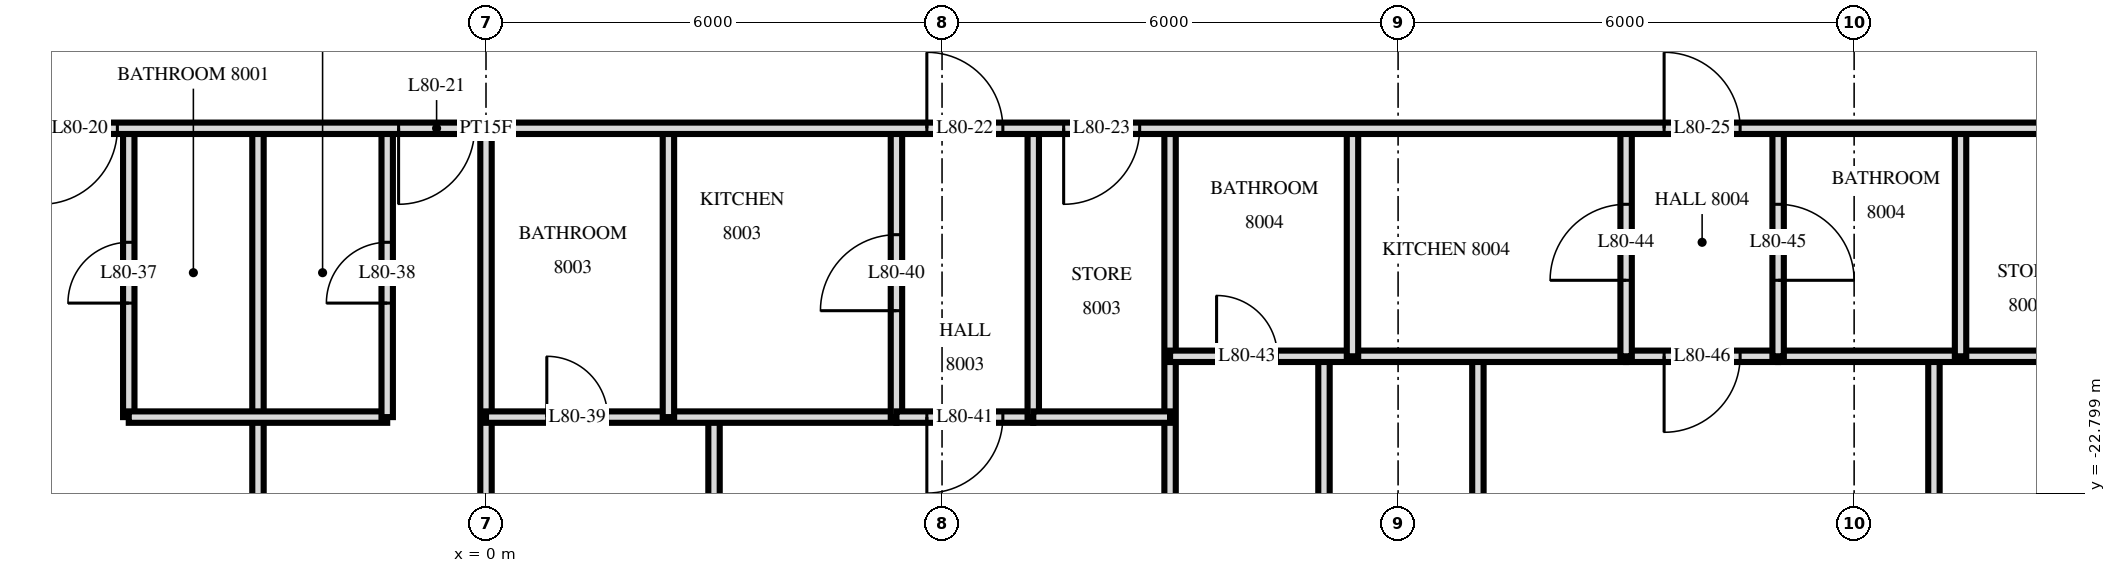
"""IFC4 building model, lengths in metres.
Left out: names, types, materials, properties, quantities, classifications, styles, units other than length and angle.
Written with IfcOpenShell. Run it as: python <this file> out.ifc"""

import sys

from ifc_helpers import new_model, si_unit, direction, frame, frame_2d, origin, place, context, subcontext, project, spatial, rectangle, extrude, element, fill, save


model = new_model("IFC4")
c1 = context("Model", 3, precision=1e-05, world=origin(), true_north=direction((0.0, 1.0)))
c2 = subcontext(c1, "Body", "Model", "MODEL_VIEW")
j1 = project(units=[si_unit("LENGTHUNIT", "METRE"), si_unit("PLANEANGLEUNIT", "RADIAN")], contexts=[c1])
p1 = place(None, origin())
s1 = spatial("IfcSite", under=j1, at=p1, CompositionType="ELEMENT")
p2 = place(p1, origin())
s2 = spatial("IfcBuilding", under=s1, at=p2, CompositionType="ELEMENT")
p3 = place(p2, frame((0.0, 0.0, 301.6)))
s3 = spatial("IfcBuildingStorey", under=s2, at=p3, CompositionType="ELEMENT", Elevation=301.6)
p4 = place(p3, frame((19.4, -21.0, 0.0), z_axis=(0.0, 0.0, 1.0), x_axis=(0.0, 1.0, 0.0)))
e1 = element("IfcWall", 1, at=p4, inside=s3, PredefinedType="PARTITIONING", context=c2, shape_type="SweptSolid", body=[
    extrude(rectangle(XDim=3.0, YDim=0.15, at=frame_2d((1.5, 0.0))), origin(), (0.0, 0.0, 1.0), 3.22),
])
p5 = place(p3, frame((19.05, -33.527, 0.0), z_axis=(0.0, 0.0, 1.0), x_axis=(0.0, 1.0, 0.0)))
e2 = element("IfcWall", 2, at=p5, inside=s3, PredefinedType="PARTITIONING", context=c2, shape_type="SweptSolid", body=[
    extrude(rectangle(XDim=12.527, YDim=0.15, at=frame_2d((6.264, 0.0))), origin(), (0.0, 0.0, 1.0), 3.22),
])
p6 = place(p5, frame((5.707, 0.0, 0.0)))
e3 = element("IfcOpeningElement", 3, at=p6, cuts=e2, PredefinedType="OPENING", context=c2, shape_type="SweptSolid", body=[
    extrude(rectangle(XDim=0.9, YDim=2.1, at=frame_2d((0.45, 1.05))), frame((0.0, 0.085, 0.0), z_axis=(0.0, -1.0, 0.0), x_axis=(1.0, 0.0, 0.0)), (0.0, 0.0, 1.0), 0.17),
])
p7 = place(p3, frame((17.0, -21.0, 0.0), z_axis=(0.0, 0.0, 1.0), x_axis=(0.0, 1.0, 0.0)))
e4 = element("IfcWall", 4, at=p7, inside=s3, PredefinedType="PARTITIONING", context=c2, shape_type="SweptSolid", body=[
    extrude(rectangle(XDim=3.0, YDim=0.15, at=frame_2d((1.5, 0.0))), origin(), (0.0, 0.0, 1.0), 3.22),
])
p8 = place(p7, frame((1.0, 0.0, 0.0)))
e5 = element("IfcOpeningElement", 5, at=p8, cuts=e4, PredefinedType="OPENING", context=c2, shape_type="SweptSolid", body=[
    extrude(rectangle(XDim=1.0, YDim=2.1, at=frame_2d((0.5, 1.05))), frame((0.0, 0.085, 0.0), z_axis=(0.0, -1.0, 0.0), x_axis=(1.0, 0.0, 0.0)), (0.0, 0.0, 1.0), 0.17),
])
p9 = place(p3, frame((15.0, -21.0, 0.0), z_axis=(0.0, 0.0, 1.0), x_axis=(0.0, 1.0, 0.0)))
e6 = element("IfcWall", 6, at=p9, inside=s3, PredefinedType="PARTITIONING", context=c2, shape_type="SweptSolid", body=[
    extrude(rectangle(XDim=3.0, YDim=0.15, at=frame_2d((1.5, 0.0))), origin(), (0.0, 0.0, 1.0), 3.22),
])
p10 = place(p9, frame((1.0, 0.0, 0.0)))
e7 = element("IfcOpeningElement", 7, at=p10, cuts=e6, PredefinedType="OPENING", context=c2, shape_type="SweptSolid", body=[
    extrude(rectangle(XDim=1.0, YDim=2.1, at=frame_2d((0.5, 1.05))), frame((0.0, 0.085, 0.0), z_axis=(0.0, -1.0, 0.0), x_axis=(1.0, 0.0, 0.0)), (0.0, 0.0, 1.0), 0.17),
])
p11 = place(p3, frame((13.05, -33.62, 0.0), z_axis=(0.0, 0.0, 1.0), x_axis=(0.0, 1.0, 0.0)))
e8 = element("IfcWall", 8, at=p11, inside=s3, PredefinedType="PARTITIONING", context=c2, shape_type="SweptSolid", body=[
    extrude(rectangle(XDim=12.62, YDim=0.15, at=frame_2d((6.31, 0.0))), origin(), (0.0, 0.0, 1.0), 3.22),
])
p12 = place(p11, frame((5.79, 0.0, 0.0)))
e9 = element("IfcOpeningElement", 9, at=p12, cuts=e8, PredefinedType="OPENING", context=c2, shape_type="SweptSolid", body=[
    extrude(rectangle(XDim=0.9, YDim=2.1, at=frame_2d((0.45, 1.05))), frame((0.0, 0.085, 0.0), z_axis=(0.0, -1.0, 0.0), x_axis=(1.0, 0.0, 0.0)), (0.0, 0.0, 1.0), 0.17),
])
p13 = place(p3, frame((11.4, -21.0, 0.0), z_axis=(0.0, 0.0, 1.0), x_axis=(0.0, 1.0, 0.0)))
e10 = element("IfcWall", 10, at=p13, inside=s3, PredefinedType="PARTITIONING", context=c2, shape_type="SweptSolid", body=[
    extrude(rectangle(XDim=3.0, YDim=0.15, at=frame_2d((1.5, 0.0))), origin(), (0.0, 0.0, 1.0), 3.22),
])
p14 = place(p3, frame((11.025, -33.62, 0.0), z_axis=(0.0, 0.0, 1.0), x_axis=(0.0, 1.0, 0.0)))
e11 = element("IfcWall", 11, at=p14, inside=s3, PredefinedType="PARTITIONING", context=c2, shape_type="SweptSolid", body=[
    extrude(rectangle(XDim=12.62, YDim=0.15, at=frame_2d((6.31, 0.0))), origin(), (0.0, 0.0, 1.0), 3.22),
])
p15 = place(p14, frame((5.79, 0.0, 0.0)))
e12 = element("IfcOpeningElement", 12, at=p15, cuts=e11, PredefinedType="OPENING", context=c2, shape_type="SweptSolid", body=[
    extrude(rectangle(XDim=0.9, YDim=2.1, at=frame_2d((0.45, 1.05))), frame((0.0, 0.085, 0.0), z_axis=(0.0, -1.0, 0.0), x_axis=(1.0, 0.0, 0.0)), (0.0, 0.0, 1.0), 0.17),
])
p16 = place(p3, frame((9.0, -33.62, 0.0), z_axis=(0.0, 0.0, 1.0), x_axis=(0.0, 1.0, 0.0)))
e13 = element("IfcWall", 13, at=p16, inside=s3, PredefinedType="PARTITIONING", context=c2, shape_type="SweptSolid", body=[
    extrude(rectangle(XDim=15.62, YDim=0.15, at=frame_2d((7.81, 0.0))), origin(), (0.0, 0.0, 1.0), 3.22),
])
p17 = place(p3, frame((7.2, -21.8, 0.0), z_axis=(0.0, 0.0, 1.0), x_axis=(0.0, 1.0, 0.0)))
e14 = element("IfcWall", 14, at=p17, inside=s3, PredefinedType="PARTITIONING", context=c2, shape_type="SweptSolid", body=[
    extrude(rectangle(XDim=3.8, YDim=0.15, at=frame_2d((1.9, 0.0))), origin(), (0.0, 0.0, 1.0), 3.22),
])
p18 = place(p3, frame((5.4, -21.8, 0.0), z_axis=(0.0, 0.0, 1.0), x_axis=(0.0, 1.0, 0.0)))
e15 = element("IfcWall", 15, at=p18, inside=s3, PredefinedType="PARTITIONING", context=c2, shape_type="SweptSolid", body=[
    extrude(rectangle(XDim=3.8, YDim=0.15, at=frame_2d((1.9, 0.0))), origin(), (0.0, 0.0, 1.0), 3.22),
])
p19 = place(p18, frame((1.4, 0.0, 0.0)))
e16 = element("IfcOpeningElement", 16, at=p19, cuts=e15, PredefinedType="OPENING", context=c2, shape_type="SweptSolid", body=[
    extrude(rectangle(XDim=1.0, YDim=2.1, at=frame_2d((0.5, 1.05))), frame((0.0, 0.085, 0.0), z_axis=(0.0, -1.0, 0.0), x_axis=(1.0, 0.0, 0.0)), (0.0, 0.0, 1.0), 0.17),
])
p20 = place(p3, frame((3.0, -33.62, 0.0), z_axis=(0.0, 0.0, 1.0), x_axis=(0.0, 1.0, 0.0)))
e17 = element("IfcWall", 17, at=p20, inside=s3, PredefinedType="PARTITIONING", context=c2, shape_type="SweptSolid", body=[
    extrude(rectangle(XDim=11.82, YDim=0.15, at=frame_2d((5.91, 0.0))), origin(), (0.0, 0.0, 1.0), 3.22),
])
p21 = place(p20, frame((5.37, 0.0, 0.0)))
e18 = element("IfcOpeningElement", 18, at=p21, cuts=e17, PredefinedType="OPENING", context=c2, shape_type="SweptSolid", body=[
    extrude(rectangle(XDim=0.9, YDim=2.1, at=frame_2d((0.45, 1.05))), frame((0.0, 0.085, 0.0), z_axis=(0.0, -1.0, 0.0), x_axis=(1.0, 0.0, 0.0)), (0.0, 0.0, 1.0), 0.17),
])
p22 = place(p3, frame((2.4, -21.8, 0.0), z_axis=(0.0, 0.0, 1.0), x_axis=(0.0, 1.0, 0.0)))
e19 = element("IfcWall", 19, at=p22, inside=s3, PredefinedType="PARTITIONING", context=c2, shape_type="SweptSolid", body=[
    extrude(rectangle(XDim=3.8, YDim=0.15, at=frame_2d((1.9, 0.0))), origin(), (0.0, 0.0, 1.0), 3.22),
])
p23 = place(p3, frame((0.0, -33.62, 0.0), z_axis=(0.0, 0.0, 1.0), x_axis=(0.0, 1.0, 0.0)))
e20 = element("IfcWall", 20, at=p23, inside=s3, PredefinedType="PARTITIONING", context=c2, shape_type="SweptSolid", body=[
    extrude(rectangle(XDim=15.62, YDim=0.15, at=frame_2d((7.81, 0.0))), origin(), (0.0, 0.0, 1.0), 3.22),
])
p24 = place(p3, frame((-1.3, -21.8, 0.0), z_axis=(0.0, 0.0, 1.0), x_axis=(0.0, 1.0, 0.0)))
e21 = element("IfcWall", 21, at=p24, inside=s3, PredefinedType="PARTITIONING", context=c2, shape_type="SweptSolid", body=[
    extrude(rectangle(XDim=3.8, YDim=0.15, at=frame_2d((1.9, 0.0))), origin(), (0.0, 0.0, 1.0), 3.22),
])
p25 = place(p24, frame((1.5, 0.0, 0.0)))
e22 = element("IfcOpeningElement", 22, at=p25, cuts=e21, PredefinedType="OPENING", context=c2, shape_type="SweptSolid", body=[
    extrude(rectangle(XDim=0.8, YDim=2.1, at=frame_2d((0.4, 1.05))), frame((0.0, 0.085, 0.0), z_axis=(0.0, -1.0, 0.0), x_axis=(1.0, 0.0, 0.0)), (0.0, 0.0, 1.0), 0.17),
])
p26 = place(p3, frame((-3.0, -33.62, 0.0), z_axis=(0.0, 0.0, 1.0), x_axis=(0.0, 1.0, 0.0)))
e23 = element("IfcWall", 23, at=p26, inside=s3, PredefinedType="PARTITIONING", context=c2, shape_type="SweptSolid", body=[
    extrude(rectangle(XDim=15.62, YDim=0.15, at=frame_2d((7.81, 0.0))), origin(), (0.0, 0.0, 1.0), 3.22),
])
p27 = place(p3, frame((-4.7, -21.8, 0.0), z_axis=(0.0, 0.0, 1.0), x_axis=(0.0, 1.0, 0.0)))
e24 = element("IfcWall", 24, at=p27, inside=s3, PredefinedType="PARTITIONING", context=c2, shape_type="SweptSolid", body=[
    extrude(rectangle(XDim=3.8, YDim=0.15, at=frame_2d((1.9, 0.0))), origin(), (0.0, 0.0, 1.0), 3.22),
])
p28 = place(p27, frame((1.5, 0.0, 0.0)))
e25 = element("IfcOpeningElement", 25, at=p28, cuts=e24, PredefinedType="OPENING", context=c2, shape_type="SweptSolid", body=[
    extrude(rectangle(XDim=0.8, YDim=2.1, at=frame_2d((0.4, 1.05))), frame((0.0, 0.085, 0.0), z_axis=(0.0, -1.0, 0.0), x_axis=(1.0, 0.0, 0.0)), (0.0, 0.0, 1.0), 0.17),
])
p29 = place(p3, frame((5.4, -21.8, 0.0), z_axis=(0.0, 0.0, 1.0), x_axis=(1.0, 0.0, 0.0)))
e26 = element("IfcWall", 26, at=p29, inside=s3, PredefinedType="PARTITIONING", context=c2, shape_type="SweptSolid", body=[
    extrude(rectangle(XDim=1.8, YDim=0.15, at=frame_2d((0.9, 0.0))), origin(), (0.0, 0.0, 1.0), 3.22),
])
p30 = place(p29, frame((0.4, 0.0, 0.0)))
e27 = element("IfcOpeningElement", 27, at=p30, cuts=e26, PredefinedType="OPENING", context=c2, shape_type="SweptSolid", body=[
    extrude(rectangle(XDim=1.0, YDim=2.1, at=frame_2d((0.5, 1.05))), frame((0.0, 0.085, 0.0), z_axis=(0.0, -1.0, 0.0), x_axis=(1.0, 0.0, 0.0)), (0.0, 0.0, 1.0), 0.17),
])
p31 = place(p3, frame((-4.7, -21.8, 0.0), z_axis=(0.0, 0.0, 1.0), x_axis=(1.0, 0.0, 0.0)))
e28 = element("IfcWall", 28, at=p31, inside=s3, PredefinedType="PARTITIONING", context=c2, shape_type="SweptSolid", body=[
    extrude(rectangle(XDim=3.4, YDim=0.15, at=frame_2d((1.7, 0.0))), origin(), (0.0, 0.0, 1.0), 3.22),
])
p32 = place(p3, frame((0.0, -21.8, 0.0), z_axis=(0.0, 0.0, 1.0), x_axis=(1.0, 0.0, 0.0)))
e29 = element("IfcWall", 29, at=p32, inside=s3, PredefinedType="PARTITIONING", context=c2, shape_type="SweptSolid", body=[
    extrude(rectangle(XDim=5.4, YDim=0.15, at=frame_2d((2.7, 0.0))), origin(), (0.0, 0.0, 1.0), 3.22),
])
p33 = place(p32, frame((0.8, 0.0, 0.0)))
e30 = element("IfcOpeningElement", 30, at=p33, cuts=e29, PredefinedType="OPENING", context=c2, shape_type="SweptSolid", body=[
    extrude(rectangle(XDim=0.8, YDim=2.1, at=frame_2d((0.4, 1.05))), frame((0.0, 0.085, 0.0), z_axis=(0.0, -1.0, 0.0), x_axis=(1.0, 0.0, 0.0)), (0.0, 0.0, 1.0), 0.17),
])
p34 = place(p3, frame((7.2, -21.8, 0.0), z_axis=(0.0, 0.0, 1.0), x_axis=(1.0, 0.0, 0.0)))
e31 = element("IfcWall", 31, at=p34, inside=s3, PredefinedType="PARTITIONING", context=c2, shape_type="SweptSolid", body=[
    extrude(rectangle(XDim=1.8, YDim=0.15, at=frame_2d((0.9, 0.0))), origin(), (0.0, 0.0, 1.0), 3.22),
])
p35 = place(p3, frame((15.0, -21.0, 0.0), z_axis=(0.0, 0.0, 1.0), x_axis=(1.0, 0.0, 0.0)))
e32 = element("IfcWall", 32, at=p35, inside=s3, PredefinedType="PARTITIONING", context=c2, shape_type="SweptSolid", body=[
    extrude(rectangle(XDim=2.0, YDim=0.15, at=frame_2d((1.0, 0.0))), origin(), (0.0, 0.0, 1.0), 3.22),
])
p36 = place(p35, frame((0.5, 0.0, 0.0)))
e33 = element("IfcOpeningElement", 33, at=p36, cuts=e32, PredefinedType="OPENING", context=c2, shape_type="SweptSolid", body=[
    extrude(rectangle(XDim=1.0, YDim=2.1, at=frame_2d((0.5, 1.05))), frame((0.0, 0.085, 0.0), z_axis=(0.0, -1.0, 0.0), x_axis=(1.0, 0.0, 0.0)), (0.0, 0.0, 1.0), 0.17),
])
p37 = place(p3, frame((9.0, -21.0, 0.0), z_axis=(0.0, 0.0, 1.0), x_axis=(1.0, 0.0, 0.0)))
e34 = element("IfcWall", 34, at=p37, inside=s3, PredefinedType="PARTITIONING", context=c2, shape_type="SweptSolid", body=[
    extrude(rectangle(XDim=6.0, YDim=0.15, at=frame_2d((3.0, 0.0))), origin(), (0.0, 0.0, 1.0), 3.22),
])
p38 = place(p37, frame((0.612, 0.0, 0.0)))
e35 = element("IfcOpeningElement", 35, at=p38, cuts=e34, PredefinedType="OPENING", context=c2, shape_type="SweptSolid", body=[
    extrude(rectangle(XDim=0.8, YDim=2.1, at=frame_2d((0.4, 1.05))), frame((0.0, 0.085, 0.0), z_axis=(0.0, -1.0, 0.0), x_axis=(1.0, 0.0, 0.0)), (0.0, 0.0, 1.0), 0.17),
])
p39 = place(p3, frame((17.0, -21.0, 0.0), z_axis=(0.0, 0.0, 1.0), x_axis=(1.0, 0.0, 0.0)))
e36 = element("IfcWall", 36, at=p39, inside=s3, PredefinedType="PARTITIONING", context=c2, shape_type="SweptSolid", body=[
    extrude(rectangle(XDim=5.92, YDim=0.15, at=frame_2d((2.96, 0.0))), origin(), (0.0, 0.0, 1.0), 3.22),
])
p40 = place(p3, frame((-22.92, -18.0, 0.0), z_axis=(0.0, 0.0, 1.0), x_axis=(1.0, 0.0, 0.0)))
e37 = element("IfcWall", 37, at=p40, inside=s3, PredefinedType="PARTITIONING", context=c2, shape_type="SweptSolid", body=[
    extrude(rectangle(XDim=45.84, YDim=0.15, at=frame_2d((22.92, 0.0))), origin(), (0.0, 0.0, 1.0), 3.22),
])
p41 = place(p40, frame((17.07, 0.0, 0.0)))
e38 = element("IfcOpeningElement", 38, at=p41, cuts=e37, PredefinedType="OPENING", context=c2, shape_type="SweptSolid", body=[
    extrude(rectangle(XDim=1.0, YDim=2.1, at=frame_2d((0.5, 1.05))), frame((0.0, 0.085, 0.0), z_axis=(0.0, -1.0, 0.0), x_axis=(1.0, 0.0, 0.0)), (0.0, 0.0, 1.0), 0.17),
])
p42 = place(p40, frame((21.77, 0.0, 0.0)))
e39 = element("IfcOpeningElement", 39, at=p42, cuts=e37, PredefinedType="OPENING", context=c2, shape_type="SweptSolid", body=[
    extrude(rectangle(XDim=1.0, YDim=2.1, at=frame_2d((0.5, 1.05))), frame((0.0, 0.085, 0.0), z_axis=(0.0, -1.0, 0.0), x_axis=(1.0, 0.0, 0.0)), (0.0, 0.0, 1.0), 0.17),
])
p43 = place(p40, frame((28.72, 0.0, 0.0)))
e40 = element("IfcOpeningElement", 40, at=p43, cuts=e37, PredefinedType="OPENING", context=c2, shape_type="SweptSolid", body=[
    extrude(rectangle(XDim=1.0, YDim=2.1, at=frame_2d((0.5, 1.05))), frame((0.0, 0.085, 0.0), z_axis=(0.0, -1.0, 0.0), x_axis=(1.0, 0.0, 0.0)), (0.0, 0.0, 1.0), 0.17),
])
p44 = place(p40, frame((30.52, 0.0, 0.0)))
e41 = element("IfcOpeningElement", 41, at=p44, cuts=e37, PredefinedType="OPENING", context=c2, shape_type="SweptSolid", body=[
    extrude(rectangle(XDim=1.0, YDim=2.1, at=frame_2d((0.5, 1.05))), frame((0.0, 0.085, 0.0), z_axis=(0.0, -1.0, 0.0), x_axis=(1.0, 0.0, 0.0)), (0.0, 0.0, 1.0), 0.17),
])
p45 = place(p40, frame((7.87, 0.0, 0.0)))
e42 = element("IfcOpeningElement", 42, at=p45, cuts=e37, PredefinedType="OPENING", context=c2, shape_type="SweptSolid", body=[
    extrude(rectangle(XDim=1.0, YDim=2.1, at=frame_2d((0.5, 1.05))), frame((0.0, 0.085, 0.0), z_axis=(0.0, -1.0, 0.0), x_axis=(1.0, 0.0, 0.0)), (0.0, 0.0, 1.0), 0.17),
])
p46 = place(p40, frame((38.42, 0.0, 0.0)))
e43 = element("IfcOpeningElement", 43, at=p46, cuts=e37, PredefinedType="OPENING", context=c2, shape_type="SweptSolid", body=[
    extrude(rectangle(XDim=1.0, YDim=2.1, at=frame_2d((0.5, 1.05))), frame((0.0, 0.085, 0.0), z_axis=(0.0, -1.0, 0.0), x_axis=(1.0, 0.0, 0.0)), (0.0, 0.0, 1.0), 0.17),
])
p47 = place(p40, frame((43.67, 0.0, 0.0)))
e44 = element("IfcOpeningElement", 44, at=p47, cuts=e37, PredefinedType="OPENING", context=c2, shape_type="SweptSolid", body=[
    extrude(rectangle(XDim=1.0, YDim=2.1, at=frame_2d((0.5, 1.05))), frame((0.0, 0.085, 0.0), z_axis=(0.0, -1.0, 0.0), x_axis=(1.0, 0.0, 0.0)), (0.0, 0.0, 1.0), 0.17),
])
p48 = place(p41, frame((0.5, 0.0, 0.0), z_axis=(0.0, 0.0, 1.0), x_axis=(-1.0, 0.0, 0.0)))
e45 = element("IfcDoor", 45, at=p48, inside=s3, OperationType="SINGLE_SWING_LEFT", PredefinedType="DOOR", context=c2, shape_type="SweptSolid", body=[
    extrude(rectangle(XDim=1.0, YDim=2.1, at=frame_2d((0.0, 1.05))), frame((0.0, -0.025, 0.0), z_axis=(0.0, 1.0, 0.0), x_axis=(-1.0, 0.0, 0.0)), (0.0, 0.0, 1.0), 0.05),
])
fill(e38, e45)
p49 = place(p42, frame((0.5, 0.0, 0.0), z_axis=(0.0, 0.0, 1.0), x_axis=(-1.0, 0.0, 0.0)))
e46 = element("IfcDoor", 46, at=p49, inside=s3, OperationType="SINGLE_SWING_LEFT", PredefinedType="DOOR", context=c2, shape_type="SweptSolid", body=[
    extrude(rectangle(XDim=1.0, YDim=2.1, at=frame_2d((0.0, 1.05))), frame((0.0, -0.025, 0.0), z_axis=(0.0, 1.0, 0.0), x_axis=(-1.0, 0.0, 0.0)), (0.0, 0.0, 1.0), 0.05),
])
fill(e39, e46)
p50 = place(p43, origin())
e47 = element("IfcDoor", 47, at=p50, inside=s3, OperationType="SINGLE_SWING_RIGHT", PredefinedType="DOOR", context=c2, shape_type="SweptSolid", body=[
    extrude(rectangle(XDim=1.0, YDim=2.1, at=frame_2d((0.5, 1.05))), frame((0.0, 0.025, 0.0), z_axis=(0.0, -1.0, 0.0), x_axis=(1.0, 0.0, 0.0)), (0.0, 0.0, 1.0), 0.05),
])
fill(e40, e47)
p51 = place(p44, frame((0.5, 0.0, 0.0), z_axis=(0.0, 0.0, 1.0), x_axis=(-1.0, 0.0, 0.0)))
e48 = element("IfcDoor", 48, at=p51, inside=s3, OperationType="SINGLE_SWING_LEFT", PredefinedType="DOOR", context=c2, shape_type="SweptSolid", body=[
    extrude(rectangle(XDim=1.0, YDim=2.1, at=frame_2d((0.0, 1.05))), frame((0.0, -0.025, 0.0), z_axis=(0.0, 1.0, 0.0), x_axis=(-1.0, 0.0, 0.0)), (0.0, 0.0, 1.0), 0.05),
])
fill(e41, e48)
p52 = place(p46, origin())
e49 = element("IfcDoor", 49, at=p52, inside=s3, OperationType="SINGLE_SWING_RIGHT", PredefinedType="DOOR", context=c2, shape_type="SweptSolid", body=[
    extrude(rectangle(XDim=1.0, YDim=2.1, at=frame_2d((0.5, 1.05))), frame((0.0, 0.025, 0.0), z_axis=(0.0, -1.0, 0.0), x_axis=(1.0, 0.0, 0.0)), (0.0, 0.0, 1.0), 0.05),
])
fill(e43, e49)
p53 = place(p28, origin())
e50 = element("IfcDoor", 50, at=p53, inside=s3, OperationType="SINGLE_SWING_RIGHT", PredefinedType="DOOR", context=c2, shape_type="SweptSolid", body=[
    extrude(rectangle(XDim=0.8, YDim=2.1, at=frame_2d((0.4, 1.05))), frame((0.0, 0.025, 0.0), z_axis=(0.0, -1.0, 0.0), x_axis=(1.0, 0.0, 0.0)), (0.0, 0.0, 1.0), 0.05),
])
fill(e25, e50)
p54 = place(p25, origin())
e51 = element("IfcDoor", 51, at=p54, inside=s3, OperationType="SINGLE_SWING_RIGHT", PredefinedType="DOOR", context=c2, shape_type="SweptSolid", body=[
    extrude(rectangle(XDim=0.8, YDim=2.1, at=frame_2d((0.4, 1.05))), frame((0.0, 0.025, 0.0), z_axis=(0.0, -1.0, 0.0), x_axis=(1.0, 0.0, 0.0)), (0.0, 0.0, 1.0), 0.05),
])
fill(e22, e51)
p55 = place(p33, origin())
e52 = element("IfcDoor", 52, at=p55, inside=s3, OperationType="SINGLE_SWING_RIGHT", PredefinedType="DOOR", context=c2, shape_type="SweptSolid", body=[
    extrude(rectangle(XDim=0.8, YDim=2.1, at=frame_2d((0.4, 1.05))), frame((0.0, 0.025, 0.0), z_axis=(0.0, -1.0, 0.0), x_axis=(1.0, 0.0, 0.0)), (0.0, 0.0, 1.0), 0.05),
])
fill(e30, e52)
p56 = place(p19, origin())
e53 = element("IfcDoor", 53, at=p56, inside=s3, OperationType="SINGLE_SWING_RIGHT", PredefinedType="DOOR", context=c2, shape_type="SweptSolid", body=[
    extrude(rectangle(XDim=1.0, YDim=2.1, at=frame_2d((0.5, 1.05))), frame((0.0, 0.025, 0.0), z_axis=(0.0, -1.0, 0.0), x_axis=(1.0, 0.0, 0.0)), (0.0, 0.0, 1.0), 0.05),
])
fill(e16, e53)
p57 = place(p30, frame((0.5, 0.0, 0.0), z_axis=(0.0, 0.0, 1.0), x_axis=(-1.0, 0.0, 0.0)))
e54 = element("IfcDoor", 54, at=p57, inside=s3, OperationType="SINGLE_SWING_LEFT", PredefinedType="DOOR", context=c2, shape_type="SweptSolid", body=[
    extrude(rectangle(XDim=1.0, YDim=2.1, at=frame_2d((0.0, 1.05))), frame((0.0, -0.025, 0.0), z_axis=(0.0, 1.0, 0.0), x_axis=(-1.0, 0.0, 0.0)), (0.0, 0.0, 1.0), 0.05),
])
fill(e27, e54)
p58 = place(p38, origin())
e55 = element("IfcDoor", 55, at=p58, inside=s3, OperationType="SINGLE_SWING_RIGHT", PredefinedType="DOOR", context=c2, shape_type="SweptSolid", body=[
    extrude(rectangle(XDim=0.8, YDim=2.1, at=frame_2d((0.4, 1.05))), frame((0.0, 0.025, 0.0), z_axis=(0.0, -1.0, 0.0), x_axis=(1.0, 0.0, 0.0)), (0.0, 0.0, 1.0), 0.05),
])
fill(e35, e55)
p59 = place(p10, origin())
e56 = element("IfcDoor", 56, at=p59, inside=s3, OperationType="SINGLE_SWING_RIGHT", PredefinedType="DOOR", context=c2, shape_type="SweptSolid", body=[
    extrude(rectangle(XDim=1.0, YDim=2.1, at=frame_2d((0.5, 1.05))), frame((0.0, 0.025, 0.0), z_axis=(0.0, -1.0, 0.0), x_axis=(1.0, 0.0, 0.0)), (0.0, 0.0, 1.0), 0.05),
])
fill(e7, e56)
p60 = place(p8, frame((0.5, 0.0, 0.0), z_axis=(0.0, 0.0, 1.0), x_axis=(-1.0, 0.0, 0.0)))
e57 = element("IfcDoor", 57, at=p60, inside=s3, OperationType="SINGLE_SWING_LEFT", PredefinedType="DOOR", context=c2, shape_type="SweptSolid", body=[
    extrude(rectangle(XDim=1.0, YDim=2.1, at=frame_2d((0.0, 1.05))), frame((0.0, -0.025, 0.0), z_axis=(0.0, 1.0, 0.0), x_axis=(-1.0, 0.0, 0.0)), (0.0, 0.0, 1.0), 0.05),
])
fill(e5, e57)
p61 = place(p36, frame((0.5, 0.0, 0.0), z_axis=(0.0, 0.0, 1.0), x_axis=(-1.0, 0.0, 0.0)))
e58 = element("IfcDoor", 58, at=p61, inside=s3, OperationType="SINGLE_SWING_LEFT", PredefinedType="DOOR", context=c2, shape_type="SweptSolid", body=[
    extrude(rectangle(XDim=1.0, YDim=2.1, at=frame_2d((0.0, 1.05))), frame((0.0, -0.025, 0.0), z_axis=(0.0, 1.0, 0.0), x_axis=(-1.0, 0.0, 0.0)), (0.0, 0.0, 1.0), 0.05),
])
fill(e33, e58)
save(model, sys.argv[1])
